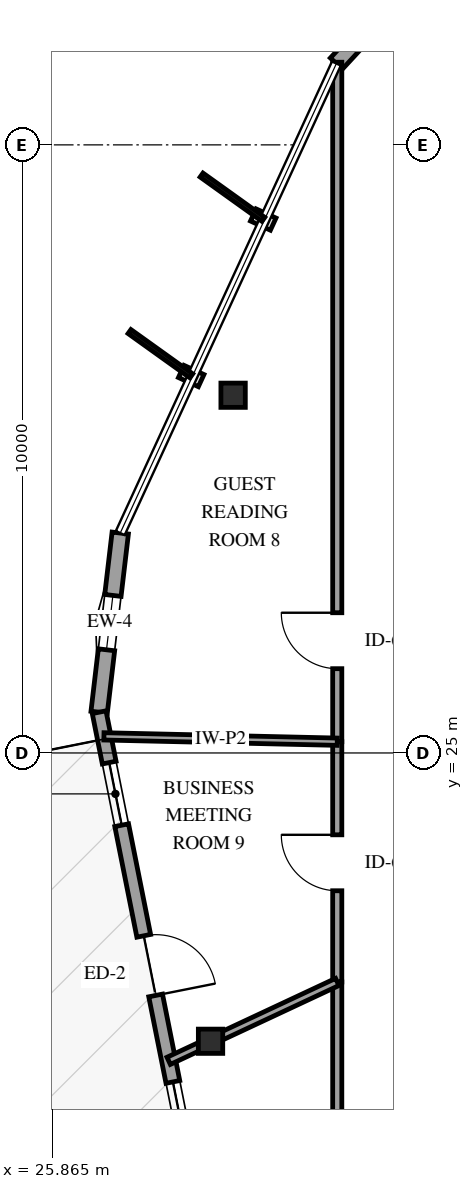
"""IFC4 building model, lengths in metres.
Left out: names, types, materials, properties, quantities, classifications, styles, units other than length and angle.
Written with IfcOpenShell. Run it as: python <this file> out.ifc"""

import sys

from ifc_helpers import new_model, si_unit, direction, frame, frame_2d, origin, origin_2d, place, context, subcontext, project, spatial, rectangle, i_section, extrude, element, fill, save


model = new_model("IFC4")
c1 = context("Model", 3, precision=1e-05, world=origin(), true_north=direction((0.0, 1.0)))
c2 = subcontext(c1, "Body", "Model", "MODEL_VIEW")
j1 = project(units=[si_unit("LENGTHUNIT", "METRE"), si_unit("PLANEANGLEUNIT", "RADIAN")], contexts=[c1])
p1 = place(None, origin())
s1 = spatial("IfcSite", under=j1, at=p1, CompositionType="ELEMENT")
p2 = place(p1, origin())
s2 = spatial("IfcBuilding", under=s1, at=p2, CompositionType="ELEMENT")
p3 = place(p2, frame((0.0, 0.0, 272.5)))
s3 = spatial("IfcBuildingStorey", under=s2, at=p3, CompositionType="ELEMENT", Elevation=272.5)
for number, where, z_axis, x_axis in (
    (1, (28.837, 30.883, 0.0), (0.0, 0.0, 1.0), (1.0, 0.0, 0.0)),
    (2, (28.466, 20.259, 0.0), (0.0, 0.0, 1.0), (1.0, 0.0, 0.0)),
):
    element("IfcColumn", number, at=place(p3, frame(where, z_axis=z_axis, x_axis=x_axis)), inside=s3, PredefinedType="COLUMN", context=c2, shape_type="SweptSolid", body=[
        extrude(i_section(OverallWidth=0.401, OverallDepth=0.399, WebThickness=0.025, FlangeThickness=0.04, FilletRadius=0.038, at=origin_2d()), origin(), (0.0, 0.0, 1.0), 3.75),
    ])
p4 = place(p3, frame((32.548, 38.517, 0.0), z_axis=(0.0, 0.0, 1.0), x_axis=(-0.678358713044, -0.734730873475, 0.0)))
e3 = element("IfcWall", 3, at=p4, inside=s3, PredefinedType="SOLIDWALL", context=c2, shape_type="SweptSolid", body=[
    extrude(rectangle(XDim=2.967, YDim=0.27, at=frame_2d((1.483, 0.0))), origin(), (0.0, 0.0, 1.0), 2.829),
])
p5 = place(p3, frame((26.981, 28.617, 0.0), z_axis=(0.0, 0.0, 1.0), x_axis=(-0.11702268659, -0.993129241752, 0.0)))
e4 = element("IfcWall", 4, at=p5, inside=s3, PredefinedType="SOLIDWALL", context=c2, shape_type="SweptSolid", body=[
    extrude(rectangle(XDim=2.967, YDim=0.27, at=frame_2d((1.483, 0.0))), origin(), (0.0, 0.0, 1.0), 2.829),
])
p6 = place(p5, frame((1.033, 0.0, 0.75)))
e5 = element("IfcOpeningElement", 5, at=p6, cuts=e4, PredefinedType="OPENING", context=c2, shape_type="SweptSolid", body=[
    extrude(rectangle(XDim=0.9, YDim=1.5, at=frame_2d((0.45, 0.75))), frame((0.0, 0.145, 0.0), z_axis=(0.0, -1.0, 0.0), x_axis=(1.0, 0.0, 0.0)), (0.0, 0.0, 1.0), 0.29),
])
p7 = place(p3, frame((26.634, 25.67, 0.0), z_axis=(0.0, 0.0, 1.0), x_axis=(0.195602411619, -0.980683280457, 0.0)))
e6 = element("IfcWall", 6, at=p7, inside=s3, PredefinedType="SOLIDWALL", context=c2, shape_type="SweptSolid", body=[
    extrude(rectangle(XDim=8.5, YDim=0.23, at=frame_2d((4.25, 0.0))), origin(), (0.0, 0.0, 1.0), 2.829),
])
p8 = place(p7, frame((3.75, 0.0, 0.0)))
e7 = element("IfcOpeningElement", 7, at=p8, cuts=e6, PredefinedType="OPENING", context=c2, shape_type="SweptSolid", body=[
    extrude(rectangle(XDim=1.0, YDim=2.15, at=frame_2d((0.5, 1.075))), frame((0.0, 0.125, 0.0), z_axis=(0.0, -1.0, 0.0), x_axis=(1.0, 0.0, 0.0)), (0.0, 0.0, 1.0), 0.25),
])
p9 = place(p7, frame((0.845, 0.0, 0.72)))
e8 = element("IfcOpeningElement", 8, at=p9, cuts=e6, PredefinedType="OPENING", context=c2, shape_type="SweptSolid", body=[
    extrude(rectangle(XDim=1.05, YDim=1.55, at=frame_2d((0.525, 0.775))), frame((0.0, 0.125, 0.0), z_axis=(0.0, -1.0, 0.0), x_axis=(1.0, 0.0, 0.0)), (0.0, 0.0, 1.0), 0.25),
])
p10 = place(p7, frame((6.2, 0.0, 0.72)))
e9 = element("IfcOpeningElement", 9, at=p10, cuts=e6, PredefinedType="OPENING", context=c2, shape_type="SweptSolid", body=[
    extrude(rectangle(XDim=1.05, YDim=1.55, at=frame_2d((0.525, 0.775))), frame((0.0, 0.125, 0.0), z_axis=(0.0, -1.0, 0.0), x_axis=(1.0, 0.0, 0.0)), (0.0, 0.0, 1.0), 0.25),
])
p11 = place(p3, frame((30.55, 25.185, 0.0), z_axis=(0.0, 0.0, 1.0), x_axis=(0.0, 1.0, 0.0)))
e10 = element("IfcWall", 10, at=p11, inside=s3, PredefinedType="PARTITIONING", context=c2, shape_type="SweptSolid", body=[
    extrude(rectangle(XDim=11.174, YDim=0.15, at=frame_2d((5.587, 0.0))), origin(), (0.0, 0.0, 1.0), 3.45),
])
p12 = place(p11, frame((1.201, 0.0, 0.0)))
e11 = element("IfcOpeningElement", 11, at=p12, cuts=e10, PredefinedType="OPENING", context=c2, shape_type="SweptSolid", body=[
    extrude(rectangle(XDim=0.92, YDim=2.12, at=frame_2d((0.46, 1.06))), frame((0.0, 0.085, 0.0), z_axis=(0.0, -1.0, 0.0), x_axis=(1.0, 0.0, 0.0)), (0.0, 0.0, 1.0), 0.17),
])
p13 = place(p3, frame((30.55, 14.006, 0.0), z_axis=(0.0, 0.0, 1.0), x_axis=(0.0, 1.0, 0.0)))
e12 = element("IfcWall", 12, at=p13, inside=s3, PredefinedType="PARTITIONING", context=c2, shape_type="SweptSolid", body=[
    extrude(rectangle(XDim=7.228, YDim=0.15, at=frame_2d((3.614, 0.0))), origin(), (0.0, 0.0, 1.0), 3.45),
])
p14 = place(p13, frame((3.139, 0.0, 0.0)))
e13 = element("IfcOpeningElement", 13, at=p14, cuts=e12, PredefinedType="OPENING", context=c2, shape_type="SweptSolid", body=[
    extrude(rectangle(XDim=0.92, YDim=2.12, at=frame_2d((0.46, 1.06))), frame((0.0, 0.085, 0.0), z_axis=(0.0, -1.0, 0.0), x_axis=(1.0, 0.0, 0.0)), (0.0, 0.0, 1.0), 0.17),
])
p15 = place(p3, frame((30.55, 21.234, 0.0), z_axis=(0.0, 0.0, 1.0), x_axis=(0.0, 1.0, 0.0)))
e14 = element("IfcWall", 14, at=p15, inside=s3, PredefinedType="PARTITIONING", context=c2, shape_type="SweptSolid", body=[
    extrude(rectangle(XDim=3.951, YDim=0.15, at=frame_2d((1.976, 0.0))), origin(), (0.0, 0.0, 1.0), 3.45),
])
p16 = place(p15, frame((1.5, 0.0, 0.0)))
e15 = element("IfcOpeningElement", 15, at=p16, cuts=e14, PredefinedType="OPENING", context=c2, shape_type="SweptSolid", body=[
    extrude(rectangle(XDim=0.92, YDim=2.12, at=frame_2d((0.46, 1.06))), frame((0.0, 0.085, 0.0), z_axis=(0.0, -1.0, 0.0), x_axis=(1.0, 0.0, 0.0)), (0.0, 0.0, 1.0), 0.17),
])
p17 = place(p3, frame((30.55, 25.185, 0.0), z_axis=(0.0, 0.0, 1.0), x_axis=(-0.99973778058, 0.022899128397, 0.0)))
e16 = element("IfcWall", 16, at=p17, inside=s3, PredefinedType="PARTITIONING", context=c2, shape_type="SweptSolid", body=[
    extrude(rectangle(XDim=3.838, YDim=0.12, at=frame_2d((1.919, 0.0))), origin(), (0.0, 0.0, 1.0), 3.45),
])
p18 = place(p3, frame((30.55, 21.234, 0.0), z_axis=(0.0, 0.0, 1.0), x_axis=(-0.905771022418, -0.423767453856, 0.0)))
e17 = element("IfcWall", 17, at=p18, inside=s3, PredefinedType="PARTITIONING", context=c2, shape_type="SweptSolid", body=[
    extrude(rectangle(XDim=3.06, YDim=0.13, at=frame_2d((1.53, 0.0))), origin(), (0.0, 0.0, 1.0), 3.45),
])
p19 = place(p6, origin())
e18 = element("IfcWindow", 18, at=p19, inside=s3, PartitioningType="SINGLE_PANEL", PredefinedType="WINDOW", context=c2, shape_type="SweptSolid", body=[
    extrude(rectangle(XDim=0.9, YDim=1.5, at=frame_2d((0.45, 0.75))), frame((0.0, 0.03, 0.0), z_axis=(0.0, -1.0, 0.0), x_axis=(1.0, 0.0, 0.0)), (0.0, 0.0, 1.0), 0.06),
])
fill(e5, e18)
p20 = place(p8, origin())
e19 = element("IfcDoor", 19, at=p20, inside=s3, OperationType="SINGLE_SWING_RIGHT", PredefinedType="DOOR", context=c2, shape_type="SweptSolid", body=[
    extrude(rectangle(XDim=1.0, YDim=2.15, at=frame_2d((0.5, 1.075))), frame((0.0, 0.025, 0.0), z_axis=(0.0, -1.0, 0.0), x_axis=(1.0, 0.0, 0.0)), (0.0, 0.0, 1.0), 0.05),
])
fill(e7, e19)
p21 = place(p9, origin())
e20 = element("IfcWindow", 20, at=p21, inside=s3, PartitioningType="SINGLE_PANEL", PredefinedType="WINDOW", context=c2, shape_type="SweptSolid", body=[
    extrude(rectangle(XDim=1.05, YDim=1.55, at=frame_2d((0.525, 0.775))), frame((0.0, 0.03, 0.0), z_axis=(0.0, -1.0, 0.0), x_axis=(1.0, 0.0, 0.0)), (0.0, 0.0, 1.0), 0.06),
])
fill(e8, e20)
p22 = place(p10, origin())
e21 = element("IfcWindow", 21, at=p22, inside=s3, PartitioningType="SINGLE_PANEL", PredefinedType="WINDOW", context=c2, shape_type="SweptSolid", body=[
    extrude(rectangle(XDim=1.05, YDim=1.55, at=frame_2d((0.525, 0.775))), frame((0.0, 0.03, 0.0), z_axis=(0.0, -1.0, 0.0), x_axis=(1.0, 0.0, 0.0)), (0.0, 0.0, 1.0), 0.06),
])
fill(e9, e21)
p23 = place(p12, origin())
e22 = element("IfcDoor", 22, at=p23, inside=s3, OperationType="SINGLE_SWING_RIGHT", PredefinedType="DOOR", context=c2, shape_type="SweptSolid", body=[
    extrude(rectangle(XDim=0.92, YDim=2.12, at=frame_2d((0.46, 1.06))), frame((0.0, 0.025, 0.0), z_axis=(0.0, -1.0, 0.0), x_axis=(1.0, 0.0, 0.0)), (0.0, 0.0, 1.0), 0.05),
])
fill(e11, e22)
p24 = place(p16, origin())
e23 = element("IfcDoor", 23, at=p24, inside=s3, OperationType="SINGLE_SWING_RIGHT", PredefinedType="DOOR", context=c2, shape_type="SweptSolid", body=[
    extrude(rectangle(XDim=0.92, YDim=2.12, at=frame_2d((0.46, 1.06))), frame((0.0, 0.025, 0.0), z_axis=(0.0, -1.0, 0.0), x_axis=(1.0, 0.0, 0.0)), (0.0, 0.0, 1.0), 0.05),
])
fill(e15, e23)
save(model, sys.argv[1])
